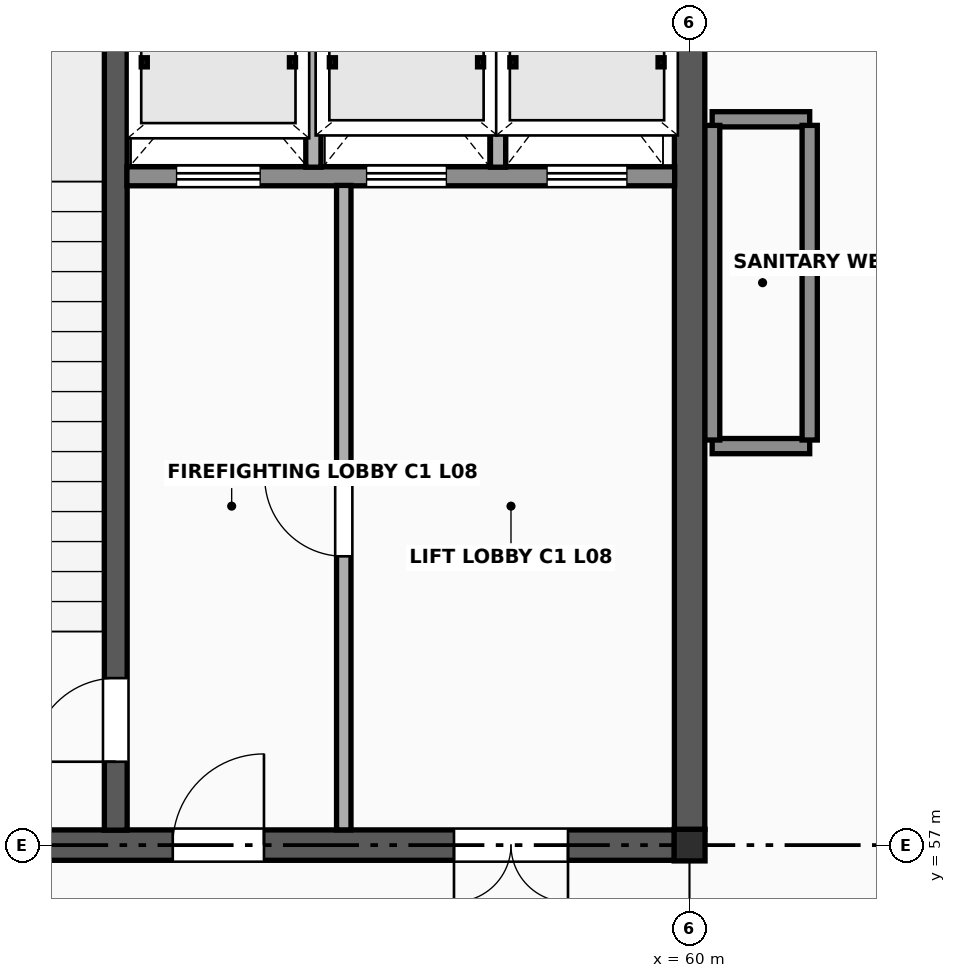
"""IFC4 building model, lengths in metres.
Left out: names, types, materials, properties, quantities, classifications, styles, units other than length and angle.
Written with IfcOpenShell. Run it as: python <this file> out.ifc"""

import sys

from ifc_helpers import new_model, si_unit, direction, frame, frame_2d, origin, origin_2d, place, context, subcontext, project, spatial, rectangle, i_section, extrude, element, fill, save


model = new_model("IFC4")
c1 = context("Model", 3, precision=1e-05, world=origin(), true_north=direction((0.0, 1.0)))
c2 = subcontext(c1, "Body", "Model", "MODEL_VIEW")
j1 = project(units=[si_unit("LENGTHUNIT", "METRE"), si_unit("PLANEANGLEUNIT", "RADIAN")], contexts=[c1])
p1 = place(None, origin())
s1 = spatial("IfcSite", under=j1, at=p1, CompositionType="ELEMENT")
p2 = place(p1, origin())
s2 = spatial("IfcBuilding", under=s1, at=p2, CompositionType="ELEMENT")
p3 = place(p2, frame((0.0, 0.0, 32.4)))
s3 = spatial("IfcBuildingStorey", under=s2, at=p3, CompositionType="ELEMENT", Elevation=32.4)
p4 = place(p3, frame((60.0, 57.0, 0.0), z_axis=(0.0, 0.0, 1.0), x_axis=(1.0, 0.0, 0.0)))
e1 = element("IfcColumn", 1, at=p4, inside=s3, PredefinedType="COLUMN", context=c2, shape_type="SweptSolid", body=[
    extrude(i_section(OverallWidth=0.406, OverallDepth=0.416, WebThickness=0.03, FlangeThickness=0.048, FilletRadius=0.018, at=origin_2d()), origin(), (0.0, 0.0, 1.0), 5.2),
])
for number, where, z_axis, x_axis in (
    (2, (60.297, 62.25, 0.0), (0.0, 0.0, 1.0), (1.0, 0.0, 0.0)),
    (3, (60.297, 66.55, 0.0), (0.0, 0.0, 1.0), (1.0, 0.0, 0.0)),
):
    element("IfcWall", number, at=place(p3, frame(where, z_axis=z_axis, x_axis=x_axis)), inside=s3, PredefinedType="SOLIDWALL", context=c2, shape_type="SweptSolid", body=[
        extrude(rectangle(XDim=1.283, YDim=0.2, at=frame_2d((0.642, 0.0))), origin(), (0.0, 0.0, 1.0), 5.043),
    ])
for number, where, z_axis, x_axis in (
    (4, (60.297, 62.33, 0.0), (0.0, 0.0, 1.0), (0.0, 1.0, 0.0)),
    (5, (61.58, 62.33, 0.0), (0.0, 0.0, 1.0), (0.0, 1.0, 0.0)),
):
    element("IfcWall", number, at=place(p3, frame(where, z_axis=z_axis, x_axis=x_axis)), inside=s3, PredefinedType="SOLIDWALL", context=c2, shape_type="SweptSolid", body=[
        extrude(rectangle(XDim=4.14, YDim=0.2, at=frame_2d((2.07, 0.0))), origin(), (0.0, 0.0, 1.0), 5.043),
    ])
p5 = place(p3, frame((48.2, 57.0, 0.0), z_axis=(0.0, 0.0, 1.0), x_axis=(1.0, 0.0, 0.0)))
e6 = element("IfcWall", 6, at=p5, inside=s3, PredefinedType="SHEAR", context=c2, shape_type="SweptSolid", body=[
    extrude(rectangle(XDim=11.6, YDim=0.4, at=frame_2d((5.8, 0.0))), origin(), (0.0, 0.0, 1.0), 5.043),
])
p6 = place(p5, frame((5.0, 0.0, 0.0)))
e7 = element("IfcOpeningElement", 7, at=p6, cuts=e6, PredefinedType="OPENING", context=c2, shape_type="SweptSolid", body=[
    extrude(rectangle(XDim=1.2, YDim=2.2, at=frame_2d((0.6, 1.1))), frame((0.0, 0.215, 0.0), z_axis=(0.0, -1.0, 0.0), x_axis=(1.0, 0.0, 0.0)), (0.0, 0.0, 1.0), 0.43),
])
p7 = place(p5, frame((8.7, 0.0, 0.0)))
e8 = element("IfcOpeningElement", 8, at=p7, cuts=e6, PredefinedType="OPENING", context=c2, shape_type="SweptSolid", body=[
    extrude(rectangle(XDim=1.5, YDim=2.25, at=frame_2d((0.75, 1.125))), frame((0.0, 0.215, 0.0), z_axis=(0.0, -1.0, 0.0), x_axis=(1.0, 0.0, 0.0)), (0.0, 0.0, 1.0), 0.43),
])
p8 = place(p3, frame((60.0, 57.205, 0.0), z_axis=(0.0, 0.0, 1.0), x_axis=(0.0, 1.0, 0.0)))
e9 = element("IfcWall", 9, at=p8, inside=s3, PredefinedType="SHEAR", context=c2, shape_type="SweptSolid", body=[
    extrude(rectangle(XDim=11.59, YDim=0.4, at=frame_2d((5.795, 0.0))), origin(), (0.0, 0.0, 1.0), 5.043),
])
p9 = place(p3, frame((52.45, 57.197, 0.0), z_axis=(0.0, 0.0, 1.0), x_axis=(0.0, 1.0, 0.0)))
e10 = element("IfcWall", 10, at=p9, inside=s3, PredefinedType="SHEAR", context=c2, shape_type="SweptSolid", body=[
    extrude(rectangle(XDim=11.606, YDim=0.3, at=frame_2d((5.803, 0.0))), origin(), (0.0, 0.0, 1.0), 5.043),
])
p10 = place(p9, frame((0.9, 0.0, 0.0)))
e11 = element("IfcOpeningElement", 11, at=p10, cuts=e10, PredefinedType="OPENING", context=c2, shape_type="SweptSolid", body=[
    extrude(rectangle(XDim=1.1, YDim=2.2, at=frame_2d((0.55, 1.1))), frame((0.0, 0.165, 0.0), z_axis=(0.0, -1.0, 0.0), x_axis=(1.0, 0.0, 0.0)), (0.0, 0.0, 1.0), 0.33),
])
p11 = place(p3, frame((52.597, 65.8, 0.0), z_axis=(0.0, 0.0, 1.0), x_axis=(1.0, 0.0, 0.0)))
e12 = element("IfcWall", 12, at=p11, inside=s3, PredefinedType="SOLIDWALL", context=c2, shape_type="SweptSolid", body=[
    extrude(rectangle(XDim=7.206, YDim=0.25, at=frame_2d((3.603, 0.0))), origin(), (0.0, 0.0, 1.0), 5.043),
])
p12 = place(p11, frame((0.653, 0.0, 0.0)))
e13 = element("IfcOpeningElement", 13, at=p12, cuts=e12, PredefinedType="OPENING", context=c2, shape_type="SweptSolid", body=[
    extrude(rectangle(XDim=1.1, YDim=2.24, at=frame_2d((0.55, 1.12))), frame((0.0, 0.14, 0.0), z_axis=(0.0, -1.0, 0.0), x_axis=(1.0, 0.0, 0.0)), (0.0, 0.0, 1.0), 0.28),
])
p13 = place(p11, frame((3.153, 0.0, 0.0)))
e14 = element("IfcOpeningElement", 14, at=p13, cuts=e12, PredefinedType="OPENING", context=c2, shape_type="SweptSolid", body=[
    extrude(rectangle(XDim=1.05, YDim=2.2, at=frame_2d((0.525, 1.1))), frame((0.0, 0.14, 0.0), z_axis=(0.0, -1.0, 0.0), x_axis=(1.0, 0.0, 0.0)), (0.0, 0.0, 1.0), 0.28),
])
p14 = place(p11, frame((5.528, 0.0, 0.0)))
e15 = element("IfcOpeningElement", 15, at=p14, cuts=e12, PredefinedType="OPENING", context=c2, shape_type="SweptSolid", body=[
    extrude(rectangle(XDim=1.05, YDim=2.2, at=frame_2d((0.525, 1.1))), frame((0.0, 0.14, 0.0), z_axis=(0.0, -1.0, 0.0), x_axis=(1.0, 0.0, 0.0)), (0.0, 0.0, 1.0), 0.28),
])
for number, where, z_axis, x_axis in (
    (16, (55.05, 65.92, 0.0), (0.0, 0.0, 1.0), (0.0, 1.0, 0.0)),
    (17, (57.48, 65.92, 0.0), (0.0, 0.0, 1.0), (0.0, 1.0, 0.0)),
):
    element("IfcWall", number, at=place(p3, frame(where, z_axis=z_axis, x_axis=x_axis)), inside=s3, PredefinedType="SOLIDWALL", context=c2, shape_type="SweptSolid", body=[
        extrude(rectangle(XDim=2.88, YDim=0.2, at=frame_2d((1.44, 0.0))), origin(), (0.0, 0.0, 1.0), 5.033),
    ])
p15 = place(p3, frame((55.45, 57.2, 0.0), z_axis=(0.0, 0.0, 1.0), x_axis=(0.0, 1.0, 0.0)))
e18 = element("IfcWall", 18, at=p15, inside=s3, PredefinedType="SOLIDWALL", context=c2, shape_type="SweptSolid", body=[
    extrude(rectangle(XDim=8.48, YDim=0.19, at=frame_2d((4.24, 0.0))), origin(), (0.0, 0.0, 1.0), 5.033),
])
p16 = place(p15, frame((3.6, 0.0, 0.0)))
e19 = element("IfcOpeningElement", 19, at=p16, cuts=e18, PredefinedType="OPENING", context=c2, shape_type="SweptSolid", body=[
    extrude(rectangle(XDim=1.04, YDim=2.18, at=frame_2d((0.52, 1.09))), frame((0.0, 0.11, 0.0), z_axis=(0.0, -1.0, 0.0), x_axis=(1.0, 0.0, 0.0)), (0.0, 0.0, 1.0), 0.22),
])
p17 = place(p10, origin())
e20 = element("IfcDoor", 20, at=p17, inside=s3, OperationType="SINGLE_SWING_LEFT", PredefinedType="DOOR", context=c2, shape_type="SweptSolid", body=[
    extrude(rectangle(XDim=1.1, YDim=2.2, at=frame_2d((0.55, 1.1))), frame((0.0, 0.025, 0.0), z_axis=(0.0, -1.0, 0.0), x_axis=(1.0, 0.0, 0.0)), (0.0, 0.0, 1.0), 0.05),
])
fill(e11, e20)
p18 = place(p16, origin())
e21 = element("IfcDoor", 21, at=p18, inside=s3, OperationType="SINGLE_SWING_RIGHT", PredefinedType="DOOR", context=c2, shape_type="SweptSolid", body=[
    extrude(rectangle(XDim=1.04, YDim=2.18, at=frame_2d((0.52, 1.09))), frame((0.0, 0.025, 0.0), z_axis=(0.0, -1.0, 0.0), x_axis=(1.0, 0.0, 0.0)), (0.0, 0.0, 1.0), 0.05),
])
fill(e19, e21)
p19 = place(p6, origin())
e22 = element("IfcDoor", 22, at=p19, inside=s3, OperationType="SINGLE_SWING_RIGHT", PredefinedType="DOOR", context=c2, shape_type="SweptSolid", body=[
    extrude(rectangle(XDim=1.2, YDim=2.2, at=frame_2d((0.6, 1.1))), frame((0.0, 0.025, 0.0), z_axis=(0.0, -1.0, 0.0), x_axis=(1.0, 0.0, 0.0)), (0.0, 0.0, 1.0), 0.05),
])
fill(e7, e22)
p20 = place(p7, origin())
e23 = element("IfcDoor", 23, at=p20, inside=s3, OperationType="DOUBLE_DOOR_SINGLE_SWING", PredefinedType="DOOR", context=c2, shape_type="SweptSolid", body=[
    extrude(rectangle(XDim=1.5, YDim=2.25, at=frame_2d((0.75, 1.125))), frame((0.0, 0.025, 0.0), z_axis=(0.0, -1.0, 0.0), x_axis=(1.0, 0.0, 0.0)), (0.0, 0.0, 1.0), 0.05),
])
fill(e8, e23)
p21 = place(p12, origin())
e24 = element("IfcDoor", 24, at=p21, inside=s3, OperationType="SLIDING_TO_LEFT", PredefinedType="USERDEFINED", context=c2, shape_type="SweptSolid", body=[
    extrude(rectangle(XDim=1.1, YDim=2.24, at=frame_2d((0.55, 1.12))), frame((0.0, 0.025, 0.0), z_axis=(0.0, -1.0, 0.0), x_axis=(1.0, 0.0, 0.0)), (0.0, 0.0, 1.0), 0.05),
])
fill(e13, e24)
p22 = place(p13, origin())
e25 = element("IfcDoor", 25, at=p22, inside=s3, OperationType="SLIDING_TO_LEFT", PredefinedType="USERDEFINED", context=c2, shape_type="SweptSolid", body=[
    extrude(rectangle(XDim=1.05, YDim=2.2, at=frame_2d((0.525, 1.1))), frame((0.0, 0.025, 0.0), z_axis=(0.0, -1.0, 0.0), x_axis=(1.0, 0.0, 0.0)), (0.0, 0.0, 1.0), 0.05),
])
fill(e14, e25)
p23 = place(p14, origin())
e26 = element("IfcDoor", 26, at=p23, inside=s3, OperationType="SLIDING_TO_LEFT", PredefinedType="USERDEFINED", context=c2, shape_type="SweptSolid", body=[
    extrude(rectangle(XDim=1.05, YDim=2.2, at=frame_2d((0.525, 1.1))), frame((0.0, 0.025, 0.0), z_axis=(0.0, -1.0, 0.0), x_axis=(1.0, 0.0, 0.0)), (0.0, 0.0, 1.0), 0.05),
])
fill(e15, e26)
save(model, sys.argv[1])
